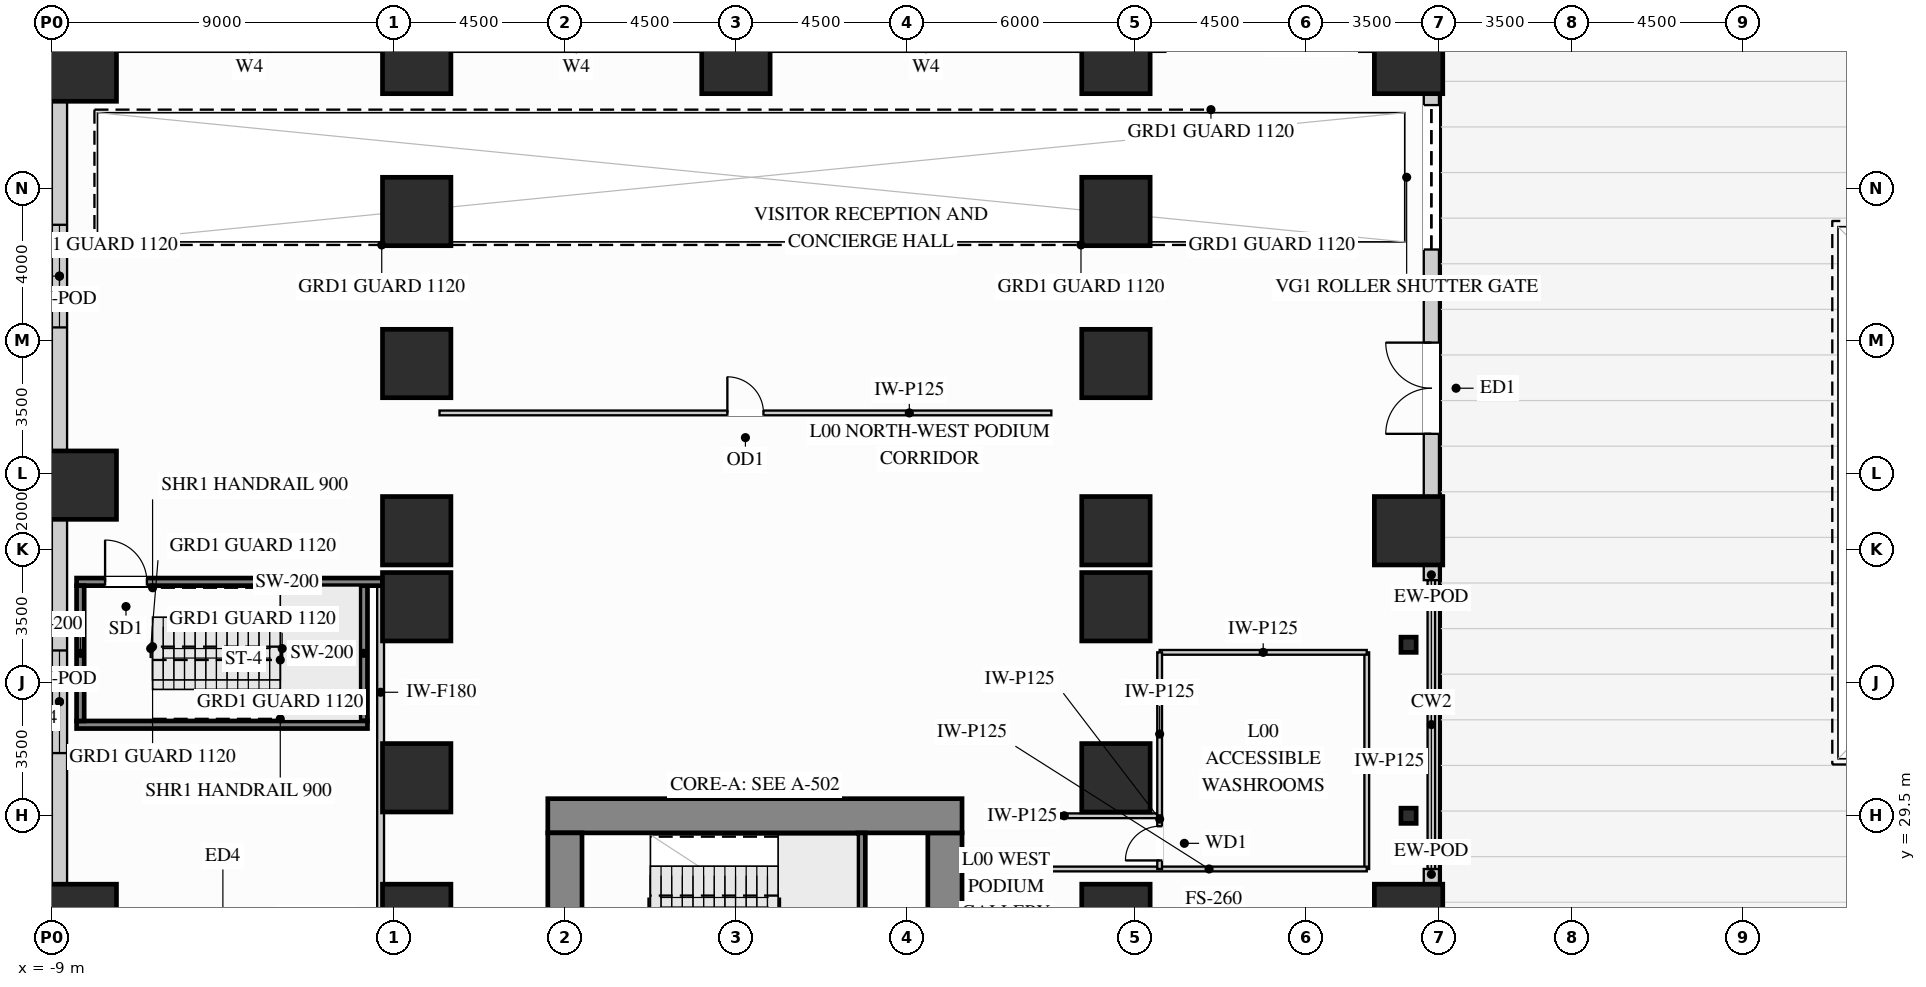
"""IFC4 building model, lengths in metres.
Left out: names, types, materials, properties, quantities, classifications, styles, units other than length and angle.
Written with IfcOpenShell. Run it as: python <this file> out.ifc"""

import sys

from ifc_helpers import new_model, si_unit, direction, frame, frame_2d, origin, origin_2d, place, context, subcontext, project, spatial, rectangle, hollow_rectangle, extrude, source, transform, mapped, element, fill, save


model = new_model("IFC4")
c1 = context("Model", 3, precision=1e-05, world=origin(), true_north=direction((0.0, 1.0)))
c2 = subcontext(c1, "Body", "Model", "MODEL_VIEW")
j1 = project(units=[si_unit("LENGTHUNIT", "METRE"), si_unit("PLANEANGLEUNIT", "RADIAN")], contexts=[c1])
p1 = place(None, origin())
s1 = spatial("IfcSite", under=j1, at=p1, CompositionType="ELEMENT")
p2 = place(p1, origin())
s2 = spatial("IfcBuilding", under=s1, at=p2, CompositionType="ELEMENT")
p3 = place(p2, origin())
s3 = spatial("IfcBuildingStorey", under=s2, at=p3, CompositionType="ELEMENT", Elevation=0.0)
m1 = source(origin(), c2, "Body", "SweptSolid", [
    extrude(rectangle(XDim=1.8, YDim=1.8, at=origin_2d()), origin(), (0.0, 0.0, 1.0), 4.25),
])
for number, where, z_axis, x_axis in (
    (1, (-8.2, 26.8, 0.0), (0.0, 0.0, 1.0), (1.0, 0.0, 0.0)),
    (2, (-8.2, 38.2, 0.0), (0.0, 0.0, 1.0), (1.0, 0.0, 0.0)),
    (3, (-8.2, 49.2, 0.0), (0.0, 0.0, 1.0), (1.0, 0.0, 0.0)),
    (4, (0.6, 26.8, 0.0), (0.0, 0.0, 1.0), (1.0, 0.0, 0.0)),
    (5, (0.6, 30.5, 0.0), (0.0, 0.0, 1.0), (1.0, 0.0, 0.0)),
    (6, (0.6, 35.0, 0.0), (0.0, 0.0, 1.0), (1.0, 0.0, 0.0)),
    (7, (0.6, 37.0, 0.0), (0.0, 0.0, 1.0), (1.0, 0.0, 0.0)),
    (8, (0.6, 41.4, 0.0), (0.0, 0.0, 1.0), (1.0, 0.0, 0.0)),
    (9, (0.6, 45.4, 0.0), (0.0, 0.0, 1.0), (1.0, 0.0, 0.0)),
    (10, (0.6, 49.4, 0.0), (0.0, 0.0, 1.0), (1.0, 0.0, 0.0)),
    (11, (9.0, 49.4, 0.0), (0.0, 0.0, 1.0), (1.0, 0.0, 0.0)),
    (12, (19.0, 49.4, 0.0), (0.0, 0.0, 1.0), (1.0, 0.0, 0.0)),
    (13, (26.7, 49.4, 0.0), (0.0, 0.0, 1.0), (1.0, 0.0, 0.0)),
    (14, (26.7, 26.8, 0.0), (0.0, 0.0, 1.0), (1.0, 0.0, 0.0)),
    (15, (26.7, 37.0, 0.0), (0.0, 0.0, 1.0), (1.0, 0.0, 0.0)),
    (16, (19.0, 26.8, 0.0), (0.0, 0.0, 1.0), (1.0, 0.0, 0.0)),
    (17, (19.0, 30.5, 0.0), (0.0, 0.0, 1.0), (1.0, 0.0, 0.0)),
    (18, (19.0, 35.0, 0.0), (0.0, 0.0, 1.0), (1.0, 0.0, 0.0)),
    (19, (19.0, 37.0, 0.0), (0.0, 0.0, 1.0), (1.0, 0.0, 0.0)),
    (20, (19.0, 41.4, 0.0), (0.0, 0.0, 1.0), (1.0, 0.0, 0.0)),
    (21, (19.0, 45.4, 0.0), (0.0, 0.0, 1.0), (1.0, 0.0, 0.0)),
):
    element("IfcColumn", number, at=place(p3, frame(where, z_axis=z_axis, x_axis=x_axis)), inside=s3, PredefinedType="COLUMN", context=c2, shape_type="MappedRepresentation", body=[
        mapped(m1, transform((0.0, 0.0, 0.0), x_axis=(1.0, 0.0, 0.0), y_axis=(0.0, 1.0, 0.0), z_axis=(0.0, 0.0, 1.0))),
    ])
m2 = source(origin(), c2, "Body", "SweptSolid", [
    extrude(hollow_rectangle(XDim=0.4, YDim=0.4, WallThickness=0.02, at=origin_2d()), origin(), (0.0, 0.0, 1.0), 4.25),
])
for number, where, z_axis, x_axis in (
    (22, (26.7, 29.5, 0.0), (0.0, 0.0, 1.0), (1.0, 0.0, 0.0)),
    (23, (26.7, 34.0, 0.0), (0.0, 0.0, 1.0), (1.0, 0.0, 0.0)),
):
    element("IfcColumn", number, at=place(p3, frame(where, z_axis=z_axis, x_axis=x_axis)), inside=s3, PredefinedType="PILASTER", context=c2, shape_type="MappedRepresentation", body=[
        mapped(m2, transform((0.0, 0.0, 0.0), x_axis=(1.0, 0.0, 0.0), y_axis=(0.0, 1.0, 0.0), z_axis=(0.0, 0.0, 1.0))),
    ])
m3 = source(origin(), c2, "Body", "SweptSolid", [
    extrude(rectangle(XDim=8.17, YDim=0.9, at=frame_2d((4.085, 0.0))), origin(), (0.0, 0.0, 1.0), 4.25),
])
p4 = place(p3, frame((14.5, 20.88, 0.0), z_axis=(0.0, 0.0, 1.0), x_axis=(0.0, 1.0, 0.0)))
e24 = element("IfcWall", 24, at=p4, inside=s3, PredefinedType="SHEAR", context=c2, shape_type="MappedRepresentation", body=[
    mapped(m3, transform((0.0, 0.0, 0.0), x_axis=(1.0, 0.0, 0.0), y_axis=(0.0, 1.0, 0.0), z_axis=(0.0, 0.0, 1.0))),
])
m4 = source(origin(), c2, "Body", "SweptSolid", [
    extrude(rectangle(XDim=10.9, YDim=0.9, at=frame_2d((5.45, 0.0))), origin(), (0.0, 0.0, 1.0), 4.25),
])
p5 = place(p3, frame((4.05, 29.5, 0.0), z_axis=(0.0, 0.0, 1.0), x_axis=(1.0, 0.0, 0.0)))
e25 = element("IfcWall", 25, at=p5, inside=s3, PredefinedType="SHEAR", context=c2, shape_type="MappedRepresentation", body=[
    mapped(m4, transform((0.0, 0.0, 0.0), x_axis=(1.0, 0.0, 0.0), y_axis=(0.0, 1.0, 0.0), z_axis=(0.0, 0.0, 1.0))),
])
m5 = source(origin(), c2, "Body", "SweptSolid", [
    extrude(rectangle(XDim=14.4, YDim=0.9, at=frame_2d((7.2, 0.0))), origin(), (0.0, 0.0, 1.0), 4.25),
])
p6 = place(p3, frame((4.5, 14.65, 0.0), z_axis=(0.0, 0.0, 1.0), x_axis=(0.0, 1.0, 0.0)))
e26 = element("IfcWall", 26, at=p6, inside=s3, PredefinedType="SHEAR", context=c2, shape_type="MappedRepresentation", body=[
    mapped(m5, transform((0.0, 0.0, 0.0), x_axis=(1.0, 0.0, 0.0), y_axis=(0.0, 1.0, 0.0), z_axis=(0.0, 0.0, 1.0))),
])
m6 = source(origin(), c2, "Body", "SweptSolid", [
    extrude(rectangle(XDim=0.402, YDim=0.4, at=frame_2d((0.201, 0.0))), origin(), (0.0, 0.0, 1.0), 4.235),
])
for number, where, z_axis, x_axis in (
    (27, (27.3, 27.698, 0.0), (0.0, 0.0, 1.0), (0.0, 1.0, 0.0)),
    (28, (27.3, 35.7, 0.0), (0.0, 0.0, 1.0), (0.0, 1.0, 0.0)),
):
    element("IfcWall", number, at=place(p3, frame(where, z_axis=z_axis, x_axis=x_axis)), inside=s3, PredefinedType="SOLIDWALL", context=c2, shape_type="MappedRepresentation", body=[
        mapped(m6, transform((0.0, 0.0, 0.0), x_axis=(1.0, 0.0, 0.0), y_axis=(0.0, 1.0, 0.0), z_axis=(0.0, 0.0, 1.0))),
    ])
p7 = place(p3, frame((27.3, 37.898, 0.0), z_axis=(0.0, 0.0, 1.0), x_axis=(0.0, 1.0, 0.0)))
e29 = element("IfcWall", 29, at=p7, inside=s3, PredefinedType="SOLIDWALL", context=c2, shape_type="SweptSolid", body=[
    extrude(rectangle(XDim=10.604, YDim=0.4, at=frame_2d((5.302, 0.0))), origin(), (0.0, 0.0, 1.0), 4.235),
])
p8 = place(p7, frame((1.652, 0.0, 0.0)))
e30 = element("IfcOpeningElement", 30, at=p8, cuts=e29, PredefinedType="OPENING", context=c2, shape_type="SweptSolid", body=[
    extrude(rectangle(XDim=2.4, YDim=2.6, at=frame_2d((1.2, 1.3))), frame((0.0, 0.21, 0.0), z_axis=(0.0, -1.0, 0.0), x_axis=(1.0, 0.0, 0.0)), (0.0, 0.0, 1.0), 0.42),
])
p9 = place(p7, frame((6.502, 0.0, 0.0)))
e31 = element("IfcOpeningElement", 31, at=p9, cuts=e29, PredefinedType="OPENING", context=c2, shape_type="SweptSolid", body=[
    extrude(rectangle(XDim=3.8, YDim=2.65, at=frame_2d((1.9, 1.325))), frame((0.0, 0.21, 0.0), z_axis=(0.0, -1.0, 0.0), x_axis=(1.0, 0.0, 0.0)), (0.0, 0.0, 1.0), 0.42),
])
p10 = place(p3, frame((-8.8, 48.302, 0.0), z_axis=(0.0, 0.0, 1.0), x_axis=(0.0, -1.0, 0.0)))
e32 = element("IfcWall", 32, at=p10, inside=s3, PredefinedType="SOLIDWALL", context=c2, shape_type="SweptSolid", body=[
    extrude(rectangle(XDim=9.204, YDim=0.4, at=frame_2d((4.602, 0.0))), origin(), (0.0, 0.0, 1.0), 4.235),
])
p11 = place(p10, frame((3.252, 0.0, 0.65)))
e33 = element("IfcOpeningElement", 33, at=p11, cuts=e32, PredefinedType="OPENING", context=c2, shape_type="SweptSolid", body=[
    extrude(rectangle(XDim=2.7, YDim=2.6, at=frame_2d((1.35, 1.3))), frame((0.0, 0.21, 0.0), z_axis=(0.0, -1.0, 0.0), x_axis=(1.0, 0.0, 0.0)), (0.0, 0.0, 1.0), 0.42),
])
p12 = place(p3, frame((-8.8, 37.302, 0.0), z_axis=(0.0, 0.0, 1.0), x_axis=(0.0, -1.0, 0.0)))
e34 = element("IfcWall", 34, at=p12, inside=s3, PredefinedType="SOLIDWALL", context=c2, shape_type="SweptSolid", body=[
    extrude(rectangle(XDim=9.604, YDim=0.4, at=frame_2d((4.802, 0.0))), origin(), (0.0, 0.0, 1.0), 4.235),
])
p13 = place(p12, frame((3.452, 0.0, 0.65)))
e35 = element("IfcOpeningElement", 35, at=p13, cuts=e34, PredefinedType="OPENING", context=c2, shape_type="SweptSolid", body=[
    extrude(rectangle(XDim=2.7, YDim=2.6, at=frame_2d((1.35, 1.3))), frame((0.0, 0.21, 0.0), z_axis=(0.0, -1.0, 0.0), x_axis=(1.0, 0.0, 0.0)), (0.0, 0.0, 1.0), 0.42),
])
m7 = source(origin(), c2, "Body", "SweptSolid", [
    extrude(rectangle(XDim=9.198, YDim=0.18, at=frame_2d((4.599, 0.0))), origin(), (0.0, 0.0, 1.0), 4.235),
])
p14 = place(p3, frame((-0.35, 26.402, 0.0), z_axis=(0.0, 0.0, 1.0), x_axis=(0.0, 1.0, 0.0)))
e36 = element("IfcWall", 36, at=p14, inside=s3, PredefinedType="PARTITIONING", context=c2, shape_type="MappedRepresentation", body=[
    mapped(m7, transform((0.0, 0.0, 0.0), x_axis=(1.0, 0.0, 0.0), y_axis=(0.0, 1.0, 0.0), z_axis=(0.0, 0.0, 1.0))),
])
p15 = place(p3, frame((1.2, 40.1, 0.0), z_axis=(0.0, 0.0, 1.0), x_axis=(1.0, 0.0, 0.0)))
e37 = element("IfcWall", 37, at=p15, inside=s3, PredefinedType="PARTITIONING", context=c2, shape_type="SweptSolid", body=[
    extrude(rectangle(XDim=16.1, YDim=0.125, at=frame_2d((8.05, 0.0))), origin(), (0.0, 0.0, 1.0), 3.686),
])
p16 = place(p15, frame((7.575, 0.0, 0.0)))
e38 = element("IfcOpeningElement", 38, at=p16, cuts=e37, PredefinedType="OPENING", context=c2, shape_type="SweptSolid", body=[
    extrude(rectangle(XDim=0.95, YDim=2.15, at=frame_2d((0.475, 1.075))), frame((0.0, 0.073, 0.0), z_axis=(0.0, -1.0, 0.0), x_axis=(1.0, 0.0, 0.0)), (0.0, 0.0, 1.0), 0.145),
])
m8 = source(origin(), c2, "Body", "SweptSolid", [
    extrude(rectangle(XDim=5.7, YDim=0.125, at=frame_2d((2.85, 0.0))), origin(), (0.0, 0.0, 1.0), 4.235),
])
p17 = place(p3, frame((25.6, 28.1, 0.0), z_axis=(0.0, 0.0, 1.0), x_axis=(0.0, 1.0, 0.0)))
e39 = element("IfcWall", 39, at=p17, inside=s3, PredefinedType="PARTITIONING", context=c2, shape_type="MappedRepresentation", body=[
    mapped(m8, transform((0.0, 0.0, 0.0), x_axis=(1.0, 0.0, 0.0), y_axis=(0.0, 1.0, 0.0), z_axis=(0.0, 0.0, 1.0))),
])
m9 = source(origin(), c2, "Body", "SweptSolid", [
    extrude(rectangle(XDim=2.85, YDim=0.125, at=frame_2d((1.425, 0.0))), origin(), (0.0, 0.0, 1.0), 4.235),
])
p18 = place(p3, frame((17.3, 29.5, 0.0), z_axis=(0.0, 0.0, 1.0), x_axis=(1.0, 0.0, 0.0)))
e40 = element("IfcWall", 40, at=p18, inside=s3, PredefinedType="PARTITIONING", context=c2, shape_type="MappedRepresentation", body=[
    mapped(m9, transform((0.0, 0.0, 0.0), x_axis=(1.0, 0.0, 0.0), y_axis=(0.0, 1.0, 0.0), z_axis=(0.0, 0.0, 1.0))),
])
m10 = source(origin(), c2, "Body", "SweptSolid", [
    extrude(rectangle(XDim=5.45, YDim=0.125, at=frame_2d((2.725, 0.0))), origin(), (0.0, 0.0, 1.0), 4.235),
])
p19 = place(p3, frame((20.15, 33.8, 0.0), z_axis=(0.0, 0.0, 1.0), x_axis=(1.0, 0.0, 0.0)))
e41 = element("IfcWall", 41, at=p19, inside=s3, PredefinedType="PARTITIONING", context=c2, shape_type="MappedRepresentation", body=[
    mapped(m10, transform((0.0, 0.0, 0.0), x_axis=(1.0, 0.0, 0.0), y_axis=(0.0, 1.0, 0.0), z_axis=(0.0, 0.0, 1.0))),
])
m11 = source(origin(), c2, "Body", "SweptSolid", [
    extrude(rectangle(XDim=8.3, YDim=0.125, at=frame_2d((4.15, 0.0))), origin(), (0.0, 0.0, 1.0), 4.235),
])
p20 = place(p3, frame((17.3, 28.1, 0.0), z_axis=(0.0, 0.0, 1.0), x_axis=(1.0, 0.0, 0.0)))
e42 = element("IfcWall", 42, at=p20, inside=s3, PredefinedType="PARTITIONING", context=c2, shape_type="MappedRepresentation", body=[
    mapped(m11, transform((0.0, 0.0, 0.0), x_axis=(1.0, 0.0, 0.0), y_axis=(0.0, 1.0, 0.0), z_axis=(0.0, 0.0, 1.0))),
])
m12 = source(origin(), c2, "Body", "SweptSolid", [
    extrude(rectangle(XDim=4.3, YDim=0.125, at=frame_2d((2.15, 0.0))), origin(), (0.0, 0.0, 1.0), 4.235),
])
p21 = place(p3, frame((20.15, 29.5, 0.0), z_axis=(0.0, 0.0, 1.0), x_axis=(0.0, 1.0, 0.0)))
e43 = element("IfcWall", 43, at=p21, inside=s3, PredefinedType="PARTITIONING", context=c2, shape_type="MappedRepresentation", body=[
    mapped(m12, transform((0.0, 0.0, 0.0), x_axis=(1.0, 0.0, 0.0), y_axis=(0.0, 1.0, 0.0), z_axis=(0.0, 0.0, 1.0))),
])
p22 = place(p3, frame((20.15, 28.1, 0.0), z_axis=(0.0, 0.0, 1.0), x_axis=(0.0, 1.0, 0.0)))
e44 = element("IfcWall", 44, at=p22, inside=s3, PredefinedType="PARTITIONING", context=c2, shape_type="SweptSolid", body=[
    extrude(rectangle(XDim=1.4, YDim=0.125, at=frame_2d((0.7, 0.0))), origin(), (0.0, 0.0, 1.0), 4.235),
])
p23 = place(p22, frame((0.225, 0.0, 0.0)))
e45 = element("IfcOpeningElement", 45, at=p23, cuts=e44, PredefinedType="OPENING", context=c2, shape_type="SweptSolid", body=[
    extrude(rectangle(XDim=0.9, YDim=2.15, at=frame_2d((0.45, 1.075))), frame((0.0, 0.073, 0.0), z_axis=(0.0, -1.0, 0.0), x_axis=(1.0, 0.0, 0.0)), (0.0, 0.0, 1.0), 0.145),
])
m13 = source(origin(), c2, "Body", "SweptSolid", [
    extrude(rectangle(XDim=3.603, YDim=0.2, at=frame_2d((1.802, 0.0))), origin(), (0.0, 0.0, 1.0), 4.25),
])
p24 = place(p3, frame((12.305, 25.445, 0.0), z_axis=(0.0, 0.0, 1.0), x_axis=(0.0, 1.0, 0.0)))
e46 = element("IfcWall", 46, at=p24, inside=s3, PredefinedType="SHEAR", context=c2, shape_type="MappedRepresentation", body=[
    mapped(m13, transform((0.0, 0.0, 0.0), x_axis=(1.0, 0.0, 0.0), y_axis=(0.0, 1.0, 0.0), z_axis=(0.0, 0.0, 1.0))),
])
m14 = source(origin(), c2, "Body", "SweptSolid", [
    extrude(rectangle(XDim=3.56, YDim=0.2, at=frame_2d((1.78, 0.0))), origin(), (0.0, 0.0, 1.0), 4.25),
])
p25 = place(p3, frame((-0.795, 31.995, 0.0), z_axis=(0.0, 0.0, 1.0), x_axis=(0.0, 1.0, 0.0)))
e47 = element("IfcWall", 47, at=p25, inside=s3, PredefinedType="SHEAR", context=c2, shape_type="MappedRepresentation", body=[
    mapped(m14, transform((0.0, 0.0, 0.0), x_axis=(1.0, 0.0, 0.0), y_axis=(0.0, 1.0, 0.0), z_axis=(0.0, 0.0, 1.0))),
])
p26 = place(p3, frame((-8.35, 35.655, 0.0), z_axis=(0.0, 0.0, 1.0), x_axis=(1.0, 0.0, 0.0)))
e48 = element("IfcWall", 48, at=p26, inside=s3, PredefinedType="SHEAR", context=c2, shape_type="SweptSolid", body=[
    extrude(rectangle(XDim=8.05, YDim=0.2, at=frame_2d((4.025, 0.0))), origin(), (0.0, 0.0, 1.0), 4.25),
])
p27 = place(p26, frame((0.75, 0.0, 0.0)))
e49 = element("IfcOpeningElement", 49, at=p27, cuts=e48, PredefinedType="OPENING", context=c2, shape_type="SweptSolid", body=[
    extrude(rectangle(XDim=1.1, YDim=2.15, at=frame_2d((0.55, 1.075))), frame((0.0, 0.11, 0.0), z_axis=(0.0, -1.0, 0.0), x_axis=(1.0, 0.0, 0.0)), (0.0, 0.0, 1.0), 0.22),
])
m15 = source(origin(), c2, "Body", "SweptSolid", [
    extrude(rectangle(XDim=7.655, YDim=0.2, at=frame_2d((3.828, 0.0))), origin(), (0.0, 0.0, 1.0), 4.25),
])
p28 = place(p3, frame((-8.35, 31.895, 0.0), z_axis=(0.0, 0.0, 1.0), x_axis=(1.0, 0.0, 0.0)))
e50 = element("IfcWall", 50, at=p28, inside=s3, PredefinedType="SHEAR", context=c2, shape_type="MappedRepresentation", body=[
    mapped(m15, transform((0.0, 0.0, 0.0), x_axis=(1.0, 0.0, 0.0), y_axis=(0.0, 1.0, 0.0), z_axis=(0.0, 0.0, 1.0))),
])
p29 = place(p3, frame((-8.25, 31.995, 0.0), z_axis=(0.0, 0.0, 1.0), x_axis=(0.0, 1.0, 0.0)))
e51 = element("IfcWall", 51, at=p29, inside=s3, PredefinedType="SHEAR", context=c2, shape_type="MappedRepresentation", body=[
    mapped(m14, transform((0.0, 0.0, 0.0), x_axis=(1.0, 0.0, 0.0), y_axis=(0.0, 1.0, 0.0), z_axis=(0.0, 0.0, 1.0))),
])
m16 = source(origin(), c2, "Body", "SweptSolid", [
    extrude(rectangle(XDim=2.4, YDim=2.6, at=frame_2d((1.2, 1.3))), frame((0.0, 0.025, 0.0), z_axis=(0.0, -1.0, 0.0), x_axis=(1.0, 0.0, 0.0)), (0.0, 0.0, 1.0), 0.05),
])
p30 = place(p8, origin())
e52 = element("IfcDoor", 52, at=p30, inside=s3, OperationType="DOUBLE_SWING_LEFT", PredefinedType="DOOR", context=c2, shape_type="MappedRepresentation", body=[
    mapped(m16, transform((0.0, 0.0, 0.0), x_axis=(1.0, 0.0, 0.0), y_axis=(0.0, 1.0, 0.0), z_axis=(0.0, 0.0, 1.0))),
])
fill(e30, e52)
m17 = source(origin(), c2, "Body", "SweptSolid", [
    extrude(rectangle(XDim=0.95, YDim=2.15, at=frame_2d((0.475, 1.075))), frame((0.0, 0.025, 0.0), z_axis=(0.0, -1.0, 0.0), x_axis=(1.0, 0.0, 0.0)), (0.0, 0.0, 1.0), 0.05),
])
p31 = place(p16, origin())
e53 = element("IfcDoor", 53, at=p31, inside=s3, OperationType="SINGLE_SWING_LEFT", PredefinedType="DOOR", context=c2, shape_type="MappedRepresentation", body=[
    mapped(m17, transform((0.0, 0.0, 0.0), x_axis=(1.0, 0.0, 0.0), y_axis=(0.0, 1.0, 0.0), z_axis=(0.0, 0.0, 1.0))),
])
fill(e38, e53)
m18 = source(origin(), c2, "Body", "SweptSolid", [
    extrude(rectangle(XDim=1.1, YDim=2.15, at=frame_2d((0.55, 1.075))), frame((0.0, 0.025, 0.0), z_axis=(0.0, -1.0, 0.0), x_axis=(1.0, 0.0, 0.0)), (0.0, 0.0, 1.0), 0.05),
])
p32 = place(p27, origin())
e54 = element("IfcDoor", 54, at=p32, inside=s3, OperationType="SINGLE_SWING_LEFT", PredefinedType="DOOR", context=c2, shape_type="MappedRepresentation", body=[
    mapped(m18, transform((0.0, 0.0, 0.0), x_axis=(1.0, 0.0, 0.0), y_axis=(0.0, 1.0, 0.0), z_axis=(0.0, 0.0, 1.0))),
])
fill(e49, e54)
m19 = source(origin(), c2, "Body", "SweptSolid", [
    extrude(rectangle(XDim=3.8, YDim=2.65, at=frame_2d((1.9, 1.325))), frame((0.0, 0.025, 0.0), z_axis=(0.0, -1.0, 0.0), x_axis=(1.0, 0.0, 0.0)), (0.0, 0.0, 1.0), 0.05),
])
p33 = place(p9, origin())
e55 = element("IfcDoor", 55, at=p33, inside=s3, OperationType="ROLLINGUP", PredefinedType="GATE", context=c2, shape_type="MappedRepresentation", body=[
    mapped(m19, transform((0.0, 0.0, 0.0), x_axis=(1.0, 0.0, 0.0), y_axis=(0.0, 1.0, 0.0), z_axis=(0.0, 0.0, 1.0))),
])
fill(e31, e55)
m20 = source(origin(), c2, "Body", "SweptSolid", [
    extrude(rectangle(XDim=0.9, YDim=2.15, at=frame_2d((0.45, 1.075))), frame((0.0, 0.025, 0.0), z_axis=(0.0, -1.0, 0.0), x_axis=(1.0, 0.0, 0.0)), (0.0, 0.0, 1.0), 0.05),
])
p34 = place(p23, origin())
e56 = element("IfcDoor", 56, at=p34, inside=s3, OperationType="SINGLE_SWING_LEFT", PredefinedType="DOOR", context=c2, shape_type="MappedRepresentation", body=[
    mapped(m20, transform((0.0, 0.0, 0.0), x_axis=(1.0, 0.0, 0.0), y_axis=(0.0, 1.0, 0.0), z_axis=(0.0, 0.0, 1.0))),
])
fill(e45, e56)
m21 = source(origin(), c2, "Body", "SweptSolid", [
    extrude(rectangle(XDim=2.7, YDim=2.6, at=frame_2d((1.35, 1.3))), frame((0.0, 0.03, 0.0), z_axis=(0.0, -1.0, 0.0), x_axis=(1.0, 0.0, 0.0)), (0.0, 0.0, 1.0), 0.06),
])
p35 = place(p11, origin())
e57 = element("IfcWindow", 57, at=p35, inside=s3, PartitioningType="SINGLE_PANEL", PredefinedType="WINDOW", context=c2, shape_type="MappedRepresentation", body=[
    mapped(m21, transform((0.0, 0.0, 0.0), x_axis=(1.0, 0.0, 0.0), y_axis=(0.0, 1.0, 0.0), z_axis=(0.0, 0.0, 1.0))),
])
fill(e33, e57)
p36 = place(p13, origin())
e58 = element("IfcWindow", 58, at=p36, inside=s3, PartitioningType="SINGLE_PANEL", PredefinedType="WINDOW", context=c2, shape_type="MappedRepresentation", body=[
    mapped(m21, transform((0.0, 0.0, 0.0), x_axis=(1.0, 0.0, 0.0), y_axis=(0.0, 1.0, 0.0), z_axis=(0.0, 0.0, 1.0))),
])
fill(e35, e58)
save(model, sys.argv[1])
